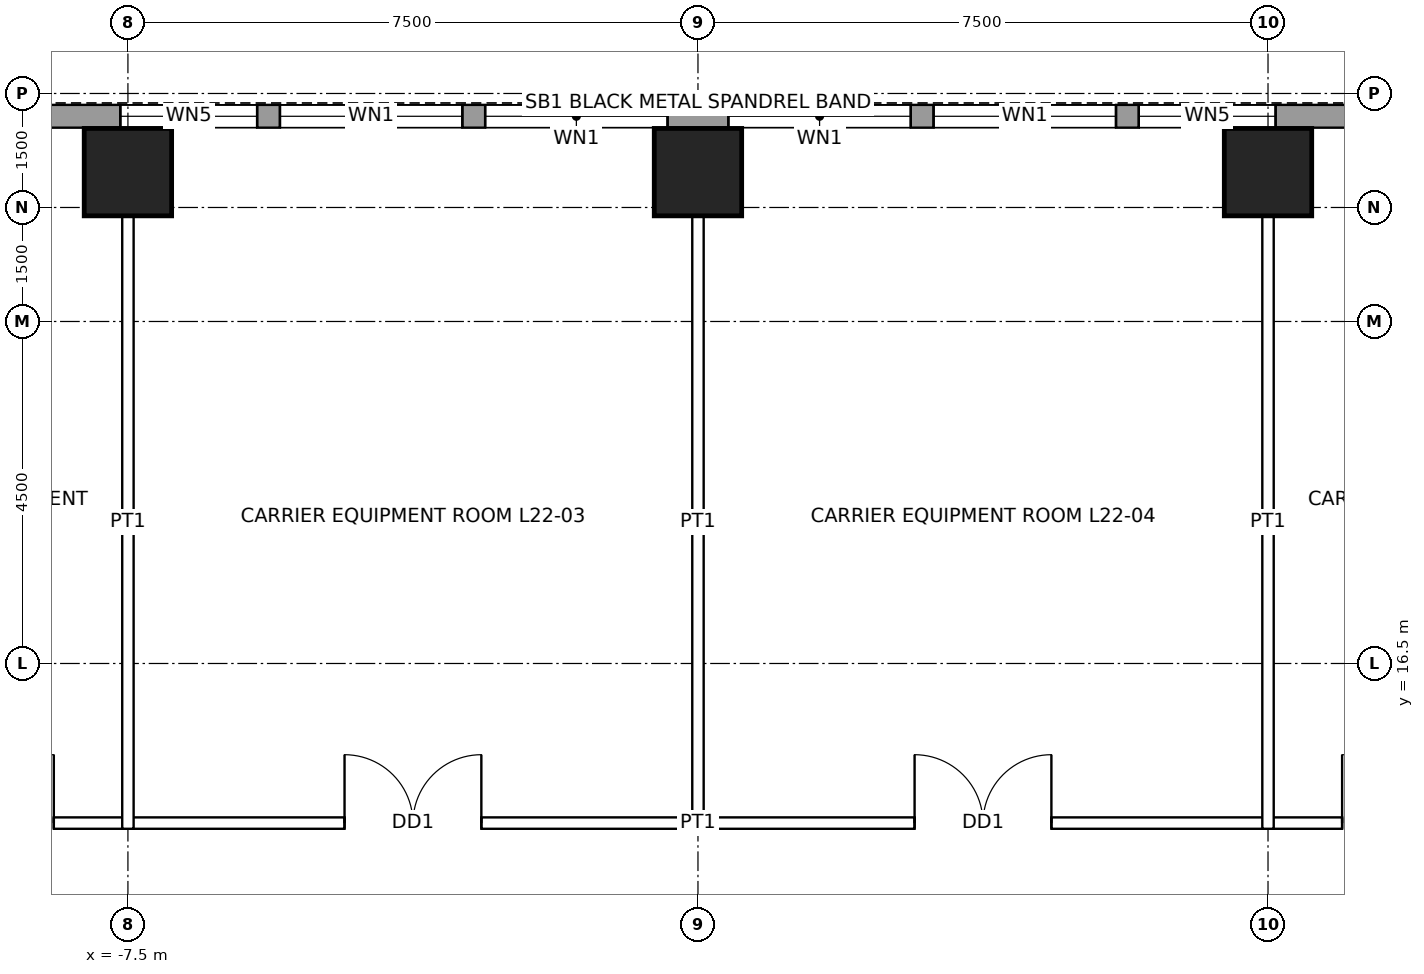
"""IFC4 building model, lengths in metres.
Left out: names, types, materials, properties, quantities, classifications, styles, units other than length and angle.
Written with IfcOpenShell. Run it as: python <this file> out.ifc"""

import sys

from ifc_helpers import new_model, si_unit, direction, frame, frame_2d, origin, origin_2d, place, context, subcontext, project, spatial, rectangle, hollow_rectangle, extrude, element, fill, save


model = new_model("IFC4")
c1 = context("Model", 3, precision=1e-05, world=origin(), true_north=direction((0.0, 1.0)))
c2 = subcontext(c1, "Body", "Model", "MODEL_VIEW")
j1 = project(units=[si_unit("LENGTHUNIT", "METRE"), si_unit("PLANEANGLEUNIT", "RADIAN")], contexts=[c1])
p1 = place(None, origin())
s1 = spatial("IfcSite", under=j1, at=p1, CompositionType="ELEMENT")
p2 = place(p1, origin())
s2 = spatial("IfcBuilding", under=s1, at=p2, CompositionType="ELEMENT")
p3 = place(p2, frame((0.0, 0.0, 113.4)))
s3 = spatial("IfcBuildingStorey", under=s2, at=p3, CompositionType="ELEMENT", Elevation=113.4)
for number, where, z_axis, x_axis in (
    (1, (-7.5, 22.965, 0.0), (0.0, 0.0, 1.0), (1.0, 0.0, 0.0)),
    (2, (0.0, 22.965, 0.0), (0.0, 0.0, 1.0), (1.0, 0.0, 0.0)),
    (3, (7.5, 22.965, 0.0), (0.0, 0.0, 1.0), (1.0, 0.0, 0.0)),
):
    element("IfcColumn", number, at=place(p3, frame(where, z_axis=z_axis, x_axis=x_axis)), inside=s3, PredefinedType="COLUMN", context=c2, shape_type="SweptSolid", body=[
        extrude(hollow_rectangle(XDim=1.15, YDim=1.15, WallThickness=0.075, at=origin_2d()), origin(), (0.0, 0.0, 1.0), 4.5),
    ])
p4 = place(p3, frame((-16.2, 23.7, 0.0), z_axis=(0.0, 0.0, 1.0), x_axis=(1.0, 0.0, 0.0)))
e4 = element("IfcWall", 4, at=p4, inside=s3, PredefinedType="SOLIDWALL", context=c2, shape_type="SweptSolid", body=[
    extrude(rectangle(XDim=32.4, YDim=0.3, at=frame_2d((16.2, 0.0))), origin(), (0.0, 0.0, 1.0), 4.3),
])
p5 = place(p4, frame((2.0, 0.0, 1.0)))
e5 = element("IfcOpeningElement", 5, at=p5, cuts=e4, PredefinedType="OPENING", context=c2, shape_type="SweptSolid", body=[
    extrude(rectangle(XDim=2.4, YDim=1.2, at=frame_2d((1.2, 0.6))), frame((0.0, 0.16, 0.0), z_axis=(0.0, -1.0, 0.0), x_axis=(1.0, 0.0, 0.0)), (0.0, 0.0, 1.0), 0.32),
])
p6 = place(p4, frame((8.6, 0.0, 1.0)))
e6 = element("IfcOpeningElement", 6, at=p6, cuts=e4, PredefinedType="OPENING", context=c2, shape_type="SweptSolid", body=[
    extrude(rectangle(XDim=1.8, YDim=1.2, at=frame_2d((0.9, 0.6))), frame((0.0, 0.16, 0.0), z_axis=(0.0, -1.0, 0.0), x_axis=(1.0, 0.0, 0.0)), (0.0, 0.0, 1.0), 0.32),
])
p7 = place(p4, frame((10.7, 0.0, 1.0)))
e7 = element("IfcOpeningElement", 7, at=p7, cuts=e4, PredefinedType="OPENING", context=c2, shape_type="SweptSolid", body=[
    extrude(rectangle(XDim=2.4, YDim=1.2, at=frame_2d((1.2, 0.6))), frame((0.0, 0.16, 0.0), z_axis=(0.0, -1.0, 0.0), x_axis=(1.0, 0.0, 0.0)), (0.0, 0.0, 1.0), 0.32),
])
p8 = place(p4, frame((13.4, 0.0, 1.0)))
e8 = element("IfcOpeningElement", 8, at=p8, cuts=e4, PredefinedType="OPENING", context=c2, shape_type="SweptSolid", body=[
    extrude(rectangle(XDim=2.4, YDim=1.2, at=frame_2d((1.2, 0.6))), frame((0.0, 0.16, 0.0), z_axis=(0.0, -1.0, 0.0), x_axis=(1.0, 0.0, 0.0)), (0.0, 0.0, 1.0), 0.32),
])
p9 = place(p4, frame((16.6, 0.0, 1.0)))
e9 = element("IfcOpeningElement", 9, at=p9, cuts=e4, PredefinedType="OPENING", context=c2, shape_type="SweptSolid", body=[
    extrude(rectangle(XDim=2.4, YDim=1.2, at=frame_2d((1.2, 0.6))), frame((0.0, 0.16, 0.0), z_axis=(0.0, -1.0, 0.0), x_axis=(1.0, 0.0, 0.0)), (0.0, 0.0, 1.0), 0.32),
])
p10 = place(p4, frame((19.3, 0.0, 1.0)))
e10 = element("IfcOpeningElement", 10, at=p10, cuts=e4, PredefinedType="OPENING", context=c2, shape_type="SweptSolid", body=[
    extrude(rectangle(XDim=2.4, YDim=1.2, at=frame_2d((1.2, 0.6))), frame((0.0, 0.16, 0.0), z_axis=(0.0, -1.0, 0.0), x_axis=(1.0, 0.0, 0.0)), (0.0, 0.0, 1.0), 0.32),
])
p11 = place(p4, frame((22.0, 0.0, 1.0)))
e11 = element("IfcOpeningElement", 11, at=p11, cuts=e4, PredefinedType="OPENING", context=c2, shape_type="SweptSolid", body=[
    extrude(rectangle(XDim=1.8, YDim=1.2, at=frame_2d((0.9, 0.6))), frame((0.0, 0.16, 0.0), z_axis=(0.0, -1.0, 0.0), x_axis=(1.0, 0.0, 0.0)), (0.0, 0.0, 1.0), 0.32),
])
p12 = place(p4, frame((28.0, 0.0, 1.0)))
e12 = element("IfcOpeningElement", 12, at=p12, cuts=e4, PredefinedType="OPENING", context=c2, shape_type="SweptSolid", body=[
    extrude(rectangle(XDim=2.4, YDim=1.2, at=frame_2d((1.2, 0.6))), frame((0.0, 0.16, 0.0), z_axis=(0.0, -1.0, 0.0), x_axis=(1.0, 0.0, 0.0)), (0.0, 0.0, 1.0), 0.32),
])
p13 = place(p3, frame((-14.475, 14.4, 0.0), z_axis=(0.0, 0.0, 1.0), x_axis=(1.0, 0.0, 0.0)))
e13 = element("IfcWall", 13, at=p13, inside=s3, PredefinedType="PARTITIONING", context=c2, shape_type="SweptSolid", body=[
    extrude(rectangle(XDim=28.95, YDim=0.15, at=frame_2d((14.475, 0.0))), origin(), (0.0, 0.0, 1.0), 4.3),
])
p14 = place(p13, frame((4.2, 0.0, 0.0)))
e14 = element("IfcOpeningElement", 14, at=p14, cuts=e13, PredefinedType="OPENING", context=c2, shape_type="SweptSolid", body=[
    extrude(rectangle(XDim=1.8, YDim=2.4, at=frame_2d((0.9, 1.2))), frame((0.0, 0.085, 0.0), z_axis=(0.0, -1.0, 0.0), x_axis=(1.0, 0.0, 0.0)), (0.0, 0.0, 1.0), 0.17),
])
p15 = place(p13, frame((9.825, 0.0, 0.0)))
e15 = element("IfcOpeningElement", 15, at=p15, cuts=e13, PredefinedType="OPENING", context=c2, shape_type="SweptSolid", body=[
    extrude(rectangle(XDim=1.8, YDim=2.4, at=frame_2d((0.9, 1.2))), frame((0.0, 0.085, 0.0), z_axis=(0.0, -1.0, 0.0), x_axis=(1.0, 0.0, 0.0)), (0.0, 0.0, 1.0), 0.17),
])
p16 = place(p13, frame((17.325, 0.0, 0.0)))
e16 = element("IfcOpeningElement", 16, at=p16, cuts=e13, PredefinedType="OPENING", context=c2, shape_type="SweptSolid", body=[
    extrude(rectangle(XDim=1.8, YDim=2.4, at=frame_2d((0.9, 1.2))), frame((0.0, 0.085, 0.0), z_axis=(0.0, -1.0, 0.0), x_axis=(1.0, 0.0, 0.0)), (0.0, 0.0, 1.0), 0.17),
])
p17 = place(p13, frame((22.95, 0.0, 0.0)))
e17 = element("IfcOpeningElement", 17, at=p17, cuts=e13, PredefinedType="OPENING", context=c2, shape_type="SweptSolid", body=[
    extrude(rectangle(XDim=1.8, YDim=2.4, at=frame_2d((0.9, 1.2))), frame((0.0, 0.085, 0.0), z_axis=(0.0, -1.0, 0.0), x_axis=(1.0, 0.0, 0.0)), (0.0, 0.0, 1.0), 0.17),
])
p18 = place(p13, frame((26.8, 0.0, 0.0)))
e18 = element("IfcOpeningElement", 18, at=p18, cuts=e13, PredefinedType="OPENING", context=c2, shape_type="SweptSolid", body=[
    extrude(rectangle(XDim=1.0, YDim=2.1, at=frame_2d((0.5, 1.05))), frame((0.0, 0.085, 0.0), z_axis=(0.0, -1.0, 0.0), x_axis=(1.0, 0.0, 0.0)), (0.0, 0.0, 1.0), 0.17),
])
p19 = place(p13, frame((1.15, 0.0, 0.0)))
e19 = element("IfcOpeningElement", 19, at=p19, cuts=e13, PredefinedType="OPENING", context=c2, shape_type="SweptSolid", body=[
    extrude(rectangle(XDim=1.0, YDim=2.1, at=frame_2d((0.5, 1.05))), frame((0.0, 0.085, 0.0), z_axis=(0.0, -1.0, 0.0), x_axis=(1.0, 0.0, 0.0)), (0.0, 0.0, 1.0), 0.17),
])
for number, where, z_axis, x_axis in (
    (20, (-7.5, 14.325, 0.0), (0.0, 0.0, 1.0), (0.0, 1.0, 0.0)),
    (21, (0.0, 14.325, 0.0), (0.0, 0.0, 1.0), (0.0, 1.0, 0.0)),
    (22, (7.5, 14.325, 0.0), (0.0, 0.0, 1.0), (0.0, 1.0, 0.0)),
):
    element("IfcWall", number, at=place(p3, frame(where, z_axis=z_axis, x_axis=x_axis)), inside=s3, PredefinedType="PARTITIONING", context=c2, shape_type="SweptSolid", body=[
        extrude(rectangle(XDim=8.065, YDim=0.15, at=frame_2d((4.032, 0.0))), origin(), (0.0, 0.0, 1.0), 3.431),
    ])
p20 = place(p6, origin())
e23 = element("IfcWindow", 23, at=p20, inside=s3, PartitioningType="SINGLE_PANEL", PredefinedType="WINDOW", context=c2, shape_type="SweptSolid", body=[
    extrude(rectangle(XDim=1.8, YDim=1.2, at=frame_2d((0.9, 0.6))), frame((0.0, 0.03, 0.0), z_axis=(0.0, -1.0, 0.0), x_axis=(1.0, 0.0, 0.0)), (0.0, 0.0, 1.0), 0.06),
])
fill(e6, e23)
p21 = place(p7, origin())
e24 = element("IfcWindow", 24, at=p21, inside=s3, PartitioningType="SINGLE_PANEL", PredefinedType="WINDOW", context=c2, shape_type="SweptSolid", body=[
    extrude(rectangle(XDim=2.4, YDim=1.2, at=frame_2d((1.2, 0.6))), frame((0.0, 0.03, 0.0), z_axis=(0.0, -1.0, 0.0), x_axis=(1.0, 0.0, 0.0)), (0.0, 0.0, 1.0), 0.06),
])
fill(e7, e24)
p22 = place(p8, origin())
e25 = element("IfcWindow", 25, at=p22, inside=s3, PartitioningType="SINGLE_PANEL", PredefinedType="WINDOW", context=c2, shape_type="SweptSolid", body=[
    extrude(rectangle(XDim=2.4, YDim=1.2, at=frame_2d((1.2, 0.6))), frame((0.0, 0.03, 0.0), z_axis=(0.0, -1.0, 0.0), x_axis=(1.0, 0.0, 0.0)), (0.0, 0.0, 1.0), 0.06),
])
fill(e8, e25)
p23 = place(p9, origin())
e26 = element("IfcWindow", 26, at=p23, inside=s3, PartitioningType="SINGLE_PANEL", PredefinedType="WINDOW", context=c2, shape_type="SweptSolid", body=[
    extrude(rectangle(XDim=2.4, YDim=1.2, at=frame_2d((1.2, 0.6))), frame((0.0, 0.03, 0.0), z_axis=(0.0, -1.0, 0.0), x_axis=(1.0, 0.0, 0.0)), (0.0, 0.0, 1.0), 0.06),
])
fill(e9, e26)
p24 = place(p10, origin())
e27 = element("IfcWindow", 27, at=p24, inside=s3, PartitioningType="SINGLE_PANEL", PredefinedType="WINDOW", context=c2, shape_type="SweptSolid", body=[
    extrude(rectangle(XDim=2.4, YDim=1.2, at=frame_2d((1.2, 0.6))), frame((0.0, 0.03, 0.0), z_axis=(0.0, -1.0, 0.0), x_axis=(1.0, 0.0, 0.0)), (0.0, 0.0, 1.0), 0.06),
])
fill(e10, e27)
p25 = place(p11, origin())
e28 = element("IfcWindow", 28, at=p25, inside=s3, PartitioningType="SINGLE_PANEL", PredefinedType="WINDOW", context=c2, shape_type="SweptSolid", body=[
    extrude(rectangle(XDim=1.8, YDim=1.2, at=frame_2d((0.9, 0.6))), frame((0.0, 0.03, 0.0), z_axis=(0.0, -1.0, 0.0), x_axis=(1.0, 0.0, 0.0)), (0.0, 0.0, 1.0), 0.06),
])
fill(e11, e28)
p26 = place(p14, origin())
e29 = element("IfcDoor", 29, at=p26, inside=s3, OperationType="DOUBLE_DOOR_SINGLE_SWING", PredefinedType="DOOR", context=c2, shape_type="SweptSolid", body=[
    extrude(rectangle(XDim=1.8, YDim=2.4, at=frame_2d((0.9, 1.2))), frame((0.0, 0.025, 0.0), z_axis=(0.0, -1.0, 0.0), x_axis=(1.0, 0.0, 0.0)), (0.0, 0.0, 1.0), 0.05),
])
fill(e14, e29)
p27 = place(p15, origin())
e30 = element("IfcDoor", 30, at=p27, inside=s3, OperationType="DOUBLE_DOOR_SINGLE_SWING", PredefinedType="DOOR", context=c2, shape_type="SweptSolid", body=[
    extrude(rectangle(XDim=1.8, YDim=2.4, at=frame_2d((0.9, 1.2))), frame((0.0, 0.025, 0.0), z_axis=(0.0, -1.0, 0.0), x_axis=(1.0, 0.0, 0.0)), (0.0, 0.0, 1.0), 0.05),
])
fill(e15, e30)
p28 = place(p16, origin())
e31 = element("IfcDoor", 31, at=p28, inside=s3, OperationType="DOUBLE_DOOR_SINGLE_SWING", PredefinedType="DOOR", context=c2, shape_type="SweptSolid", body=[
    extrude(rectangle(XDim=1.8, YDim=2.4, at=frame_2d((0.9, 1.2))), frame((0.0, 0.025, 0.0), z_axis=(0.0, -1.0, 0.0), x_axis=(1.0, 0.0, 0.0)), (0.0, 0.0, 1.0), 0.05),
])
fill(e16, e31)
p29 = place(p17, origin())
e32 = element("IfcDoor", 32, at=p29, inside=s3, OperationType="DOUBLE_DOOR_SINGLE_SWING", PredefinedType="DOOR", context=c2, shape_type="SweptSolid", body=[
    extrude(rectangle(XDim=1.8, YDim=2.4, at=frame_2d((0.9, 1.2))), frame((0.0, 0.025, 0.0), z_axis=(0.0, -1.0, 0.0), x_axis=(1.0, 0.0, 0.0)), (0.0, 0.0, 1.0), 0.05),
])
fill(e17, e32)
save(model, sys.argv[1])
